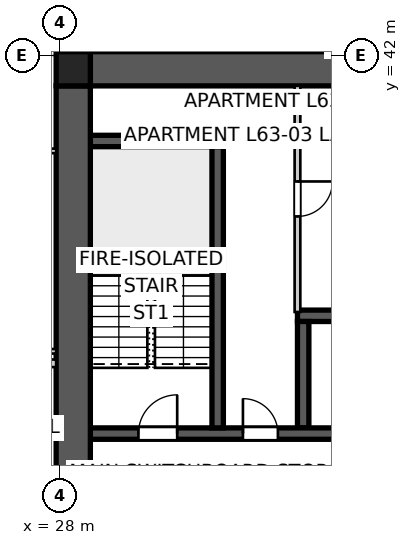
"""IFC4 building model, lengths in metres.
Left out: names, types, materials, properties, quantities, classifications, styles, units other than length and angle.
Written with IfcOpenShell. Run it as: python <this file> out.ifc"""

import sys

from ifc_helpers import new_model, si_unit, direction, frame, frame_2d, origin, origin_2d, place, context, subcontext, project, spatial, polyline, rectangle, outline, extrude, element, fill, save


model = new_model("IFC4")
c1 = context("Model", 3, precision=1e-05, world=origin(), true_north=direction((0.0, 1.0)))
c2 = subcontext(c1, "Body", "Model", "MODEL_VIEW")
j1 = project(units=[si_unit("LENGTHUNIT", "METRE"), si_unit("PLANEANGLEUNIT", "RADIAN")], contexts=[c1])
p1 = place(None, origin())
s1 = spatial("IfcSite", under=j1, at=p1, CompositionType="ELEMENT")
p2 = place(p1, origin())
s2 = spatial("IfcBuilding", under=s1, at=p2, CompositionType="ELEMENT")
p3 = place(p2, frame((0.0, 0.0, 228.6)))
s3 = spatial("IfcBuildingStorey", under=s2, at=p3, CompositionType="ELEMENT", Elevation=228.6)
p4 = place(p3, frame((28.8, 41.65, 0.0), z_axis=(0.0, 0.0, 1.0), x_axis=(1.0, 0.0, 0.0)))
e1 = element("IfcWall", 1, at=p4, inside=s3, PredefinedType="SHEAR", context=c2, shape_type="SweptSolid", body=[
    extrude(outline(polyline([(0.0, -0.45), (22.4, -0.45), (22.4, -0.025), (22.85, -0.025), (22.85, 0.025), (22.4, 0.025), (22.4, 0.45), (0.0, 0.45), (0.0, 0.025), (-0.45, 0.025), (-0.45, -0.025), (0.0, -0.025), (0.0, -0.45)])), origin(), (0.0, 0.0, 1.0), 3.4),
])
p5 = place(p3, frame((28.35, 41.2, 0.0), z_axis=(0.0, 0.0, 1.0), x_axis=(0.0, -1.0, 0.0)))
e2 = element("IfcWall", 2, at=p5, inside=s3, PredefinedType="SHEAR", context=c2, shape_type="SweptSolid", body=[
    extrude(outline(polyline([(0.0, -0.45), (22.4, -0.45), (22.4, -0.025), (22.85, -0.025), (22.85, 0.025), (22.4, 0.025), (22.4, 0.45), (0.0, 0.45), (0.0, 0.025), (-0.45, 0.025), (-0.45, -0.025), (0.0, -0.025), (0.0, -0.45)])), origin(), (0.0, 0.0, 1.0), 3.4),
])
p6 = place(p5, frame((11.14, 0.0, 0.0)))
e3 = element("IfcOpeningElement", 3, at=p6, cuts=e2, PredefinedType="OPENING", context=c2, shape_type="SweptSolid", body=[
    extrude(rectangle(XDim=1.02, YDim=2.4, at=frame_2d((0.51, 1.2))), frame((0.0, 0.46, 0.0), z_axis=(0.0, -1.0, 0.0), x_axis=(1.0, 0.0, 0.0)), (0.0, 0.0, 1.0), 0.92),
])
p7 = place(p3, frame((28.8, 32.05, 0.0), z_axis=(0.0, 0.0, 1.0), x_axis=(1.0, 0.0, 0.0)))
e4 = element("IfcWall", 4, at=p7, inside=s3, PredefinedType="SHEAR", context=c2, shape_type="SweptSolid", body=[
    extrude(rectangle(XDim=22.4, YDim=0.3, at=frame_2d((11.2, 0.0))), origin(), (0.0, 0.0, 1.0), 3.4),
])
p8 = place(p7, frame((19.04, 0.0, 0.0)))
e5 = element("IfcOpeningElement", 5, at=p8, cuts=e4, PredefinedType="OPENING", context=c2, shape_type="SweptSolid", body=[
    extrude(rectangle(XDim=0.92, YDim=2.1, at=frame_2d((0.46, 1.05))), frame((0.0, 0.16, 0.0), z_axis=(0.0, -1.0, 0.0), x_axis=(1.0, 0.0, 0.0)), (0.0, 0.0, 1.0), 0.32),
])
p9 = place(p7, frame((1.265, 0.0, 0.0)))
e6 = element("IfcOpeningElement", 6, at=p9, cuts=e4, PredefinedType="OPENING", context=c2, shape_type="SweptSolid", body=[
    extrude(rectangle(XDim=1.02, YDim=2.1, at=frame_2d((0.51, 1.05))), frame((0.0, 0.16, 0.0), z_axis=(0.0, -1.0, 0.0), x_axis=(1.0, 0.0, 0.0)), (0.0, 0.0, 1.0), 0.32),
])
p10 = place(p7, frame((4.015, 0.0, 0.0)))
e7 = element("IfcOpeningElement", 7, at=p10, cuts=e4, PredefinedType="OPENING", context=c2, shape_type="SweptSolid", body=[
    extrude(rectangle(XDim=0.92, YDim=2.1, at=frame_2d((0.46, 1.05))), frame((0.0, 0.16, 0.0), z_axis=(0.0, -1.0, 0.0), x_axis=(1.0, 0.0, 0.0)), (0.0, 0.0, 1.0), 0.32),
])
p11 = place(p7, frame((6.565, 0.0, 0.0)))
e8 = element("IfcOpeningElement", 8, at=p11, cuts=e4, PredefinedType="OPENING", context=c2, shape_type="SweptSolid", body=[
    extrude(rectangle(XDim=0.92, YDim=2.1, at=frame_2d((0.46, 1.05))), frame((0.0, 0.16, 0.0), z_axis=(0.0, -1.0, 0.0), x_axis=(1.0, 0.0, 0.0)), (0.0, 0.0, 1.0), 0.32),
])
p12 = place(p7, frame((8.89, 0.0, 0.0)))
e9 = element("IfcOpeningElement", 9, at=p12, cuts=e4, PredefinedType="OPENING", context=c2, shape_type="SweptSolid", body=[
    extrude(rectangle(XDim=0.92, YDim=2.1, at=frame_2d((0.46, 1.05))), frame((0.0, 0.16, 0.0), z_axis=(0.0, -1.0, 0.0), x_axis=(1.0, 0.0, 0.0)), (0.0, 0.0, 1.0), 0.32),
])
p13 = place(p7, frame((12.05, 0.0, 0.0)))
e10 = element("IfcOpeningElement", 10, at=p13, cuts=e4, PredefinedType="OPENING", context=c2, shape_type="SweptSolid", body=[
    extrude(rectangle(XDim=1.1, YDim=2.1, at=frame_2d((0.55, 1.05))), frame((0.0, 0.16, 0.0), z_axis=(0.0, -1.0, 0.0), x_axis=(1.0, 0.0, 0.0)), (0.0, 0.0, 1.0), 0.32),
])
p14 = place(p7, frame((14.85, 0.0, 0.0)))
e11 = element("IfcOpeningElement", 11, at=p14, cuts=e4, PredefinedType="OPENING", context=c2, shape_type="SweptSolid", body=[
    extrude(rectangle(XDim=1.1, YDim=2.1, at=frame_2d((0.55, 1.05))), frame((0.0, 0.16, 0.0), z_axis=(0.0, -1.0, 0.0), x_axis=(1.0, 0.0, 0.0)), (0.0, 0.0, 1.0), 0.32),
])
p15 = place(p3, frame((34.25, 35.15, 0.0), z_axis=(0.0, 0.0, 1.0), x_axis=(1.0, 0.0, 0.0)))
e12 = element("IfcWall", 12, at=p15, inside=s3, PredefinedType="SHEAR", context=c2, shape_type="SweptSolid", body=[
    extrude(rectangle(XDim=11.5, YDim=0.3, at=frame_2d((5.75, 0.0))), origin(), (0.0, 0.0, 1.0), 3.4),
])
p16 = place(p3, frame((34.4, 32.2, 0.0), z_axis=(0.0, 0.0, 1.0), x_axis=(0.0, 1.0, 0.0)))
e13 = element("IfcWall", 13, at=p16, inside=s3, PredefinedType="SHEAR", context=c2, shape_type="SweptSolid", body=[
    extrude(rectangle(XDim=2.8, YDim=0.3, at=frame_2d((1.4, 0.0))), origin(), (0.0, 0.0, 1.0), 3.4),
])
p17 = place(p3, frame((32.15, 32.2, 0.0), z_axis=(0.0, 0.0, 1.0), x_axis=(0.0, 1.0, 0.0)))
e14 = element("IfcWall", 14, at=p17, inside=s3, PredefinedType="SHEAR", context=c2, shape_type="SweptSolid", body=[
    extrude(rectangle(XDim=7.7, YDim=0.3, at=frame_2d((3.85, 0.0))), origin(), (0.0, 0.0, 1.0), 3.4),
])
p18 = place(p3, frame((28.8, 39.75, 0.0), z_axis=(0.0, 0.0, 1.0), x_axis=(1.0, 0.0, 0.0)))
e15 = element("IfcWall", 15, at=p18, inside=s3, PredefinedType="SHEAR", context=c2, shape_type="SweptSolid", body=[
    extrude(rectangle(XDim=3.5, YDim=0.3, at=frame_2d((1.75, 0.0))), origin(), (0.0, 0.0, 1.0), 3.4),
])
p19 = place(p3, frame((28.35, 41.65, 0.0), z_axis=(0.0, 0.0, 1.0), x_axis=(1.0, 0.0, 0.0)))
e16 = element("IfcColumn", 16, at=p19, inside=s3, PredefinedType="COLUMN", context=c2, shape_type="SweptSolid", body=[
    extrude(rectangle(XDim=0.9, YDim=0.9, at=origin_2d()), origin(), (0.0, 0.0, 1.0), 3.4),
])
p20 = place(p3, frame((27.9, 33.9, 0.0), z_axis=(0.0, 0.0, 1.0), x_axis=(-1.0, 0.0, 0.0)))
e17 = element("IfcWall", 17, at=p20, inside=s3, PredefinedType="PARTITIONING", context=c2, shape_type="SweptSolid", body=[
    extrude(rectangle(XDim=3.3, YDim=0.2, at=frame_2d((1.65, 0.0))), origin(), (0.0, 0.0, 1.0), 3.25),
])
p21 = place(p3, frame((34.25, 41.2, 0.0), z_axis=(0.0, 0.0, 1.0), x_axis=(0.0, -1.0, 0.0)))
e18 = element("IfcWall", 18, at=p21, inside=s3, PredefinedType="SOLIDWALL", context=c2, shape_type="SweptSolid", body=[
    extrude(rectangle(XDim=5.95, YDim=0.15, at=frame_2d((2.975, 0.0))), origin(), (0.0, 0.0, 1.0), 3.25),
])
p22 = place(p21, frame((2.515, 0.0, 0.0)))
e19 = element("IfcOpeningElement", 19, at=p22, cuts=e18, PredefinedType="OPENING", context=c2, shape_type="SweptSolid", body=[
    extrude(rectangle(XDim=0.92, YDim=2.1, at=frame_2d((0.46, 1.05))), frame((0.0, 0.085, 0.0), z_axis=(0.0, -1.0, 0.0), x_axis=(1.0, 0.0, 0.0)), (0.0, 0.0, 1.0), 0.17),
])
p23 = place(p3, frame((23.783, 34.216, 0.0), z_axis=(0.0, 0.0, 1.0), x_axis=(1.0, 0.0, 0.0)))
e20 = element("IfcWall", 20, at=p23, inside=s3, PredefinedType="PARTITIONING", context=c2, shape_type="SweptSolid", body=[
    extrude(rectangle(XDim=4.117, YDim=0.12, at=frame_2d((2.058, 0.0))), origin(), (0.0, 0.0, 1.0), 3.25),
])
p24 = place(p3, frame((27.9, 39.49, 0.0), z_axis=(0.0, 0.0, 1.0), x_axis=(-1.0, 0.0, 0.0)))
e21 = element("IfcWall", 21, at=p24, inside=s3, PredefinedType="PARTITIONING", context=c2, shape_type="SweptSolid", body=[
    extrude(rectangle(XDim=4.116, YDim=0.12, at=frame_2d((2.058, 0.0))), origin(), (0.0, 0.0, 1.0), 3.25),
])
p25 = place(p24, frame((2.367, 0.0, 0.0)))
e22 = element("IfcOpeningElement", 22, at=p25, cuts=e21, PredefinedType="OPENING", context=c2, shape_type="SweptSolid", body=[
    extrude(rectangle(XDim=0.96, YDim=2.1, at=frame_2d((0.48, 1.05))), frame((0.0, 0.07, 0.0), z_axis=(0.0, -1.0, 0.0), x_axis=(1.0, 0.0, 0.0)), (0.0, 0.0, 1.0), 0.14),
])
p26 = place(p9, origin())
e23 = element("IfcDoor", 23, at=p26, inside=s3, OperationType="SINGLE_SWING_RIGHT", PredefinedType="DOOR", context=c2, shape_type="SweptSolid", body=[
    extrude(rectangle(XDim=1.02, YDim=2.1, at=frame_2d((0.51, 1.05))), frame((0.0, 0.025, 0.0), z_axis=(0.0, -1.0, 0.0), x_axis=(1.0, 0.0, 0.0)), (0.0, 0.0, 1.0), 0.05),
])
fill(e6, e23)
p27 = place(p10, origin())
e24 = element("IfcDoor", 24, at=p27, inside=s3, OperationType="SINGLE_SWING_LEFT", PredefinedType="DOOR", context=c2, shape_type="SweptSolid", body=[
    extrude(rectangle(XDim=0.92, YDim=2.1, at=frame_2d((0.46, 1.05))), frame((0.0, 0.025, 0.0), z_axis=(0.0, -1.0, 0.0), x_axis=(1.0, 0.0, 0.0)), (0.0, 0.0, 1.0), 0.05),
])
fill(e7, e24)
p28 = place(p22, origin())
e25 = element("IfcDoor", 25, at=p28, inside=s3, OperationType="SINGLE_SWING_LEFT", PredefinedType="DOOR", context=c2, shape_type="SweptSolid", body=[
    extrude(rectangle(XDim=0.92, YDim=2.1, at=frame_2d((0.46, 1.05))), frame((0.0, 0.025, 0.0), z_axis=(0.0, -1.0, 0.0), x_axis=(1.0, 0.0, 0.0)), (0.0, 0.0, 1.0), 0.05),
])
fill(e19, e25)
save(model, sys.argv[1])
